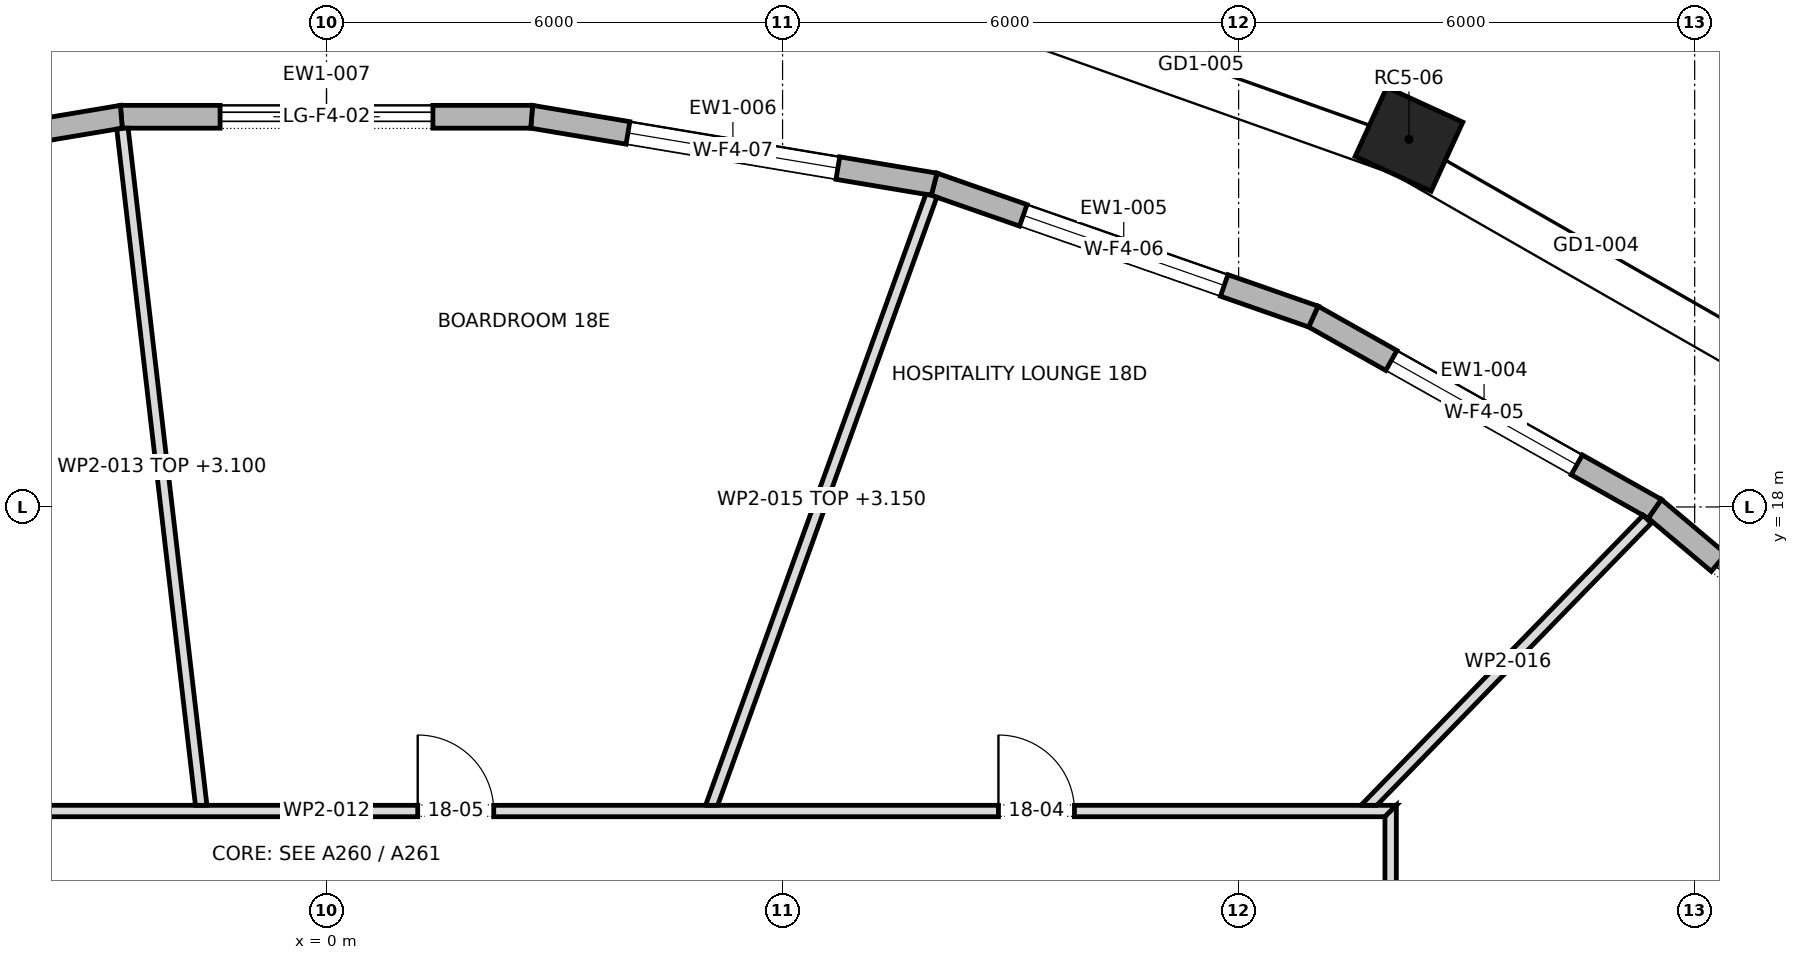
"""IFC4 building model, lengths in metres.
Left out: names, types, materials, properties, quantities, classifications, styles, units other than length and angle.
Written with IfcOpenShell. Run it as: python <this file> out.ifc"""

import sys

from ifc_helpers import new_model, si_unit, direction, frame, frame_2d, origin, origin_2d, place, context, subcontext, project, spatial, polyline, rectangle, outline, extrude, element, fill, save


model = new_model("IFC4")
c1 = context("Model", 3, precision=1e-05, world=origin(), true_north=direction((0.0, 1.0)))
c2 = subcontext(c1, "Body", "Model", "MODEL_VIEW")
j1 = project(units=[si_unit("LENGTHUNIT", "METRE"), si_unit("PLANEANGLEUNIT", "RADIAN")], contexts=[c1])
p1 = place(None, origin())
s1 = spatial("IfcSite", under=j1, at=p1, CompositionType="ELEMENT")
p2 = place(p1, origin())
s2 = spatial("IfcBuilding", under=s1, at=p2, CompositionType="ELEMENT")
p3 = place(p2, frame((0.0, 0.0, 256.3)))
s3 = spatial("IfcBuildingStorey", under=s2, at=p3, CompositionType="ELEMENT", Elevation=256.3)
p4 = place(p3, frame((14.241, 22.837, 0.0), z_axis=(0.0, 0.0, 1.0), x_axis=(-0.909127822794, 0.416517228722, 0.0)))
e1 = element("IfcColumn", 1, at=p4, inside=s3, PredefinedType="COLUMN", context=c2, shape_type="SweptSolid", body=[
    extrude(rectangle(XDim=1.1, YDim=1.0, at=origin_2d()), origin(), (0.0, 0.0, 1.0), 4.0),
])
p5 = place(p3, frame((21.297, 14.756, 0.0), z_axis=(0.0, 0.0, 1.0), x_axis=(-0.764746492461, 0.644331283013, 0.0)))
e2 = element("IfcWall", 2, at=p5, inside=s3, PredefinedType="STANDARD", context=c2, shape_type="SweptSolid", body=[
    extrude(outline(polyline([(-0.015, -0.15), (5.012, -0.15), (4.984, 0.15), (0.015, 0.15), (-0.015, -0.15)])), origin(), (0.0, 0.0, 1.0), 3.7),
])
p6 = place(p5, frame((1.099, 0.0, 0.0)))
e3 = element("IfcOpeningElement", 3, at=p6, cuts=e2, PredefinedType="OPENING", context=c2, shape_type="SweptSolid", body=[
    extrude(rectangle(XDim=2.8, YDim=3.25, at=frame_2d((1.4, 1.625))), frame((0.0, 0.162, 0.0), z_axis=(0.0, -1.0, 0.0), x_axis=(1.0, 0.0, 0.0)), (0.0, 0.0, 1.0), 0.324),
])
p7 = place(p3, frame((17.475, 17.976, 0.0), z_axis=(0.0, 0.0, 1.0), x_axis=(-0.871411047742, 0.490553550465, 0.0)))
e4 = element("IfcWall", 4, at=p7, inside=s3, PredefinedType="STANDARD", context=c2, shape_type="SweptSolid", body=[
    extrude(outline(polyline([(-0.014, -0.15), (5.168, -0.15), (5.141, 0.15), (0.014, 0.15), (-0.014, -0.15)])), origin(), (0.0, 0.0, 1.0), 3.7),
])
p8 = place(p7, frame((1.177, 0.0, 0.6)))
e5 = element("IfcOpeningElement", 5, at=p8, cuts=e4, PredefinedType="OPENING", context=c2, shape_type="SweptSolid", body=[
    extrude(rectangle(XDim=2.8, YDim=2.65, at=frame_2d((1.4, 1.325))), frame((0.0, 0.162, 0.0), z_axis=(0.0, -1.0, 0.0), x_axis=(1.0, 0.0, 0.0)), (0.0, 0.0, 1.0), 0.324),
])
p9 = place(p3, frame((12.983, 20.505, 0.0), z_axis=(0.0, 0.0, 1.0), x_axis=(-0.944149712872, 0.32951679727, 0.0)))
e6 = element("IfcWall", 6, at=p9, inside=s3, PredefinedType="STANDARD", context=c2, shape_type="SweptSolid", body=[
    extrude(outline(polyline([(-0.013, -0.15), (5.297, -0.15), (5.271, 0.15), (0.013, 0.15), (-0.013, -0.15)])), origin(), (0.0, 0.0, 1.0), 3.7),
])
p10 = place(p9, frame((1.242, 0.0, 0.6)))
e7 = element("IfcOpeningElement", 7, at=p10, cuts=e6, PredefinedType="OPENING", context=c2, shape_type="SweptSolid", body=[
    extrude(rectangle(XDim=2.8, YDim=2.65, at=frame_2d((1.4, 1.325))), frame((0.0, 0.162, 0.0), z_axis=(0.0, -1.0, 0.0), x_axis=(1.0, 0.0, 0.0)), (0.0, 0.0, 1.0), 0.324),
])
p11 = place(p3, frame((7.994, 22.246, 0.0), z_axis=(0.0, 0.0, 1.0), x_axis=(-0.986243571741, 0.165298569867, 0.0)))
e8 = element("IfcWall", 8, at=p11, inside=s3, PredefinedType="STANDARD", context=c2, shape_type="SweptSolid", body=[
    extrude(outline(polyline([(-0.013, -0.15), (5.381, -0.15), (5.356, 0.15), (0.013, 0.15), (-0.013, -0.15)])), origin(), (0.0, 0.0, 1.0), 3.7),
])
p12 = place(p11, frame((1.284, 0.0, 0.6)))
e9 = element("IfcOpeningElement", 9, at=p12, cuts=e8, PredefinedType="OPENING", context=c2, shape_type="SweptSolid", body=[
    extrude(rectangle(XDim=2.8, YDim=2.65, at=frame_2d((1.4, 1.325))), frame((0.0, 0.162, 0.0), z_axis=(0.0, -1.0, 0.0), x_axis=(1.0, 0.0, 0.0)), (0.0, 0.0, 1.0), 0.324),
])
p13 = place(p3, frame((2.699, 23.134, 0.0), z_axis=(0.0, 0.0, 1.0), x_axis=(-1.0, 0.0, 0.0)))
e10 = element("IfcWall", 10, at=p13, inside=s3, PredefinedType="STANDARD", context=c2, shape_type="SweptSolid", body=[
    extrude(outline(polyline([(-0.012, -0.15), (5.411, -0.15), (5.386, 0.15), (0.012, 0.15), (-0.012, -0.15)])), origin(), (0.0, 0.0, 1.0), 3.7),
])
p14 = place(p13, frame((1.299, 0.0, 0.0)))
e11 = element("IfcOpeningElement", 11, at=p14, cuts=e10, PredefinedType="OPENING", context=c2, shape_type="SweptSolid", body=[
    extrude(rectangle(XDim=2.8, YDim=3.25, at=frame_2d((1.4, 1.625))), frame((0.0, 0.162, 0.0), z_axis=(0.0, -1.0, 0.0), x_axis=(1.0, 0.0, 0.0)), (0.0, 0.0, 1.0), 0.324),
])
p15 = place(p3, frame((-2.699, 23.134, 0.0), z_axis=(0.0, 0.0, 1.0), x_axis=(-0.986243571741, -0.165298569867, 0.0)))
e12 = element("IfcWall", 12, at=p15, inside=s3, PredefinedType="STANDARD", context=c2, shape_type="SweptSolid", body=[
    extrude(outline(polyline([(-0.012, -0.15), (5.382, -0.15), (5.356, 0.15), (0.012, 0.15), (-0.012, -0.15)])), origin(), (0.0, 0.0, 1.0), 3.7),
])
p16 = place(p15, frame((1.284, 0.0, 0.6)))
e13 = element("IfcOpeningElement", 13, at=p16, cuts=e12, PredefinedType="OPENING", context=c2, shape_type="SweptSolid", body=[
    extrude(rectangle(XDim=2.8, YDim=2.65, at=frame_2d((1.4, 1.325))), frame((0.0, 0.162, 0.0), z_axis=(0.0, -1.0, 0.0), x_axis=(1.0, 0.0, 0.0)), (0.0, 0.0, 1.0), 0.324),
])
p17 = place(p3, frame((-14.075, 14.0, 0.0), z_axis=(0.0, 0.0, 1.0), x_axis=(1.0, 0.0, 0.0)))
e14 = element("IfcWall", 14, at=p17, inside=s3, PredefinedType="PARTITIONING", context=c2, shape_type="SweptSolid", body=[
    extrude(outline(polyline([(0.15, -0.075), (2.139, -0.075), (4.128, -0.075), (6.118, -0.075), (8.107, -0.075), (10.096, -0.075), (12.086, -0.075), (14.075, -0.075), (16.064, -0.075), (18.053, -0.075), (20.043, -0.075), (22.032, -0.075), (24.021, -0.075), (26.011, -0.075), (28.0, -0.075), (28.15, 0.075), (26.273, 0.075), (24.396, 0.075), (22.52, 0.075), (20.643, 0.075), (18.767, 0.075), (16.89, 0.075), (15.013, 0.075), (13.137, 0.075), (11.26, 0.075), (9.383, 0.075), (7.507, 0.075), (5.63, 0.075), (3.753, 0.075), (1.877, 0.075), (0.0, 0.075), (0.15, -0.075)])), origin(), (0.0, 0.0, 1.0), 3.7),
])
p18 = place(p17, frame((22.915, 0.0, 0.0)))
e15 = element("IfcOpeningElement", 15, at=p18, cuts=e14, PredefinedType="OPENING", context=c2, shape_type="SweptSolid", body=[
    extrude(rectangle(XDim=1.0, YDim=2.1, at=frame_2d((0.5, 1.05))), frame((0.0, 0.087, 0.0), z_axis=(0.0, -1.0, 0.0), x_axis=(1.0, 0.0, 0.0)), (0.0, 0.0, 1.0), 0.174),
])
p19 = place(p17, frame((15.275, 0.0, 0.0)))
e16 = element("IfcOpeningElement", 16, at=p19, cuts=e14, PredefinedType="OPENING", context=c2, shape_type="SweptSolid", body=[
    extrude(rectangle(XDim=1.0, YDim=2.1, at=frame_2d((0.5, 1.05))), frame((0.0, 0.087, 0.0), z_axis=(0.0, -1.0, 0.0), x_axis=(1.0, 0.0, 0.0)), (0.0, 0.0, 1.0), 0.174),
])
p20 = place(p17, frame((5.355, 0.0, 0.0)))
e17 = element("IfcOpeningElement", 17, at=p20, cuts=e14, PredefinedType="OPENING", context=c2, shape_type="SweptSolid", body=[
    extrude(rectangle(XDim=1.8, YDim=2.1, at=frame_2d((0.9, 1.05))), frame((0.0, 0.087, 0.0), z_axis=(0.0, -1.0, 0.0), x_axis=(1.0, 0.0, 0.0)), (0.0, 0.0, 1.0), 0.174),
])
p21 = place(p3, frame((-1.648, 14.067, 0.0), z_axis=(0.0, 0.0, 1.0), x_axis=(-0.115608238976, 0.993294888279, 0.0)))
e18 = element("IfcWall", 18, at=p21, inside=s3, PredefinedType="PARTITIONING", context=c2, shape_type="SweptSolid", body=[
    extrude(outline(polyline([(0.0, -0.075), (1.794, -0.075), (3.587, -0.075), (5.381, -0.075), (7.175, -0.075), (8.968, -0.075), (8.973, -0.036), (8.973, 0.075), (7.182, 0.075), (5.391, 0.075), (3.599, 0.075), (1.808, 0.075), (0.017, 0.075), (0.0, -0.072), (0.0, -0.075)])), origin(), (0.0, 0.0, 1.0), 3.1),
])
p22 = place(p3, frame((5.058, 14.05, 0.0), z_axis=(0.0, 0.0, 1.0), x_axis=(0.339015479588, 0.940780795191, 0.0)))
e19 = element("IfcWall", 19, at=p22, inside=s3, PredefinedType="PARTITIONING", context=c2, shape_type="SweptSolid", body=[
    extrude(outline(polyline([(8.557, -0.075), (8.557, -0.05), (8.556, 0.002), (8.543, 0.075), (6.834, 0.075), (5.126, 0.075), (3.417, 0.075), (1.709, 0.075), (0.0, 0.075), (0.0, 0.074), (0.054, -0.075), (1.754, -0.075), (3.455, -0.075), (5.156, -0.075), (6.856, -0.075), (8.557, -0.075)])), origin(), (0.0, 0.0, 1.0), 3.15),
])
p23 = place(p3, frame((13.662, 14.023, 0.0), z_axis=(0.0, 0.0, 1.0), x_axis=(0.697340314613, 0.716740179992, 0.0)))
e20 = element("IfcWall", 20, at=p23, inside=s3, PredefinedType="PARTITIONING", context=c2, shape_type="SweptSolid", body=[
    extrude(outline(polyline([(0.0, 0.075), (0.0, 0.075), (0.146, -0.075), (1.871, -0.075), (3.597, -0.075), (5.323, -0.075), (5.323, 0.075), (3.549, 0.075), (1.774, 0.075), (0.0, 0.075)])), origin(), (0.0, 0.0, 1.0), 3.7),
])
p24 = place(p3, frame((14.0, -14.075, 0.0), z_axis=(0.0, 0.0, 1.0), x_axis=(0.0, 1.0, 0.0)))
e21 = element("IfcWall", 21, at=p24, inside=s3, PredefinedType="PARTITIONING", context=c2, shape_type="SweptSolid", body=[
    extrude(outline(polyline([(0.0, -0.075), (1.877, -0.075), (3.753, -0.075), (5.63, -0.075), (7.507, -0.075), (9.383, -0.075), (11.26, -0.075), (13.137, -0.075), (15.013, -0.075), (16.89, -0.075), (18.767, -0.075), (20.643, -0.075), (22.52, -0.075), (24.396, -0.075), (26.273, -0.075), (28.15, -0.075), (28.0, 0.075), (26.011, 0.075), (24.021, 0.075), (22.032, 0.075), (20.043, 0.075), (18.053, 0.075), (16.064, 0.075), (14.075, 0.075), (12.086, 0.075), (10.096, 0.075), (8.107, 0.075), (6.118, 0.075), (4.128, 0.075), (2.139, 0.075), (0.15, 0.075), (0.0, -0.075)])), origin(), (0.0, 0.0, 1.0), 3.7),
])
p25 = place(p24, frame((12.365, 0.0, 0.0)))
e22 = element("IfcOpeningElement", 22, at=p25, cuts=e21, PredefinedType="OPENING", context=c2, shape_type="SweptSolid", body=[
    extrude(rectangle(XDim=1.0, YDim=2.1, at=frame_2d((0.5, 1.05))), frame((0.0, 0.087, 0.0), z_axis=(0.0, -1.0, 0.0), x_axis=(1.0, 0.0, 0.0)), (0.0, 0.0, 1.0), 0.174),
])
p26 = place(p24, frame((20.755, 0.0, 0.0)))
e23 = element("IfcOpeningElement", 23, at=p26, cuts=e21, PredefinedType="OPENING", context=c2, shape_type="SweptSolid", body=[
    extrude(rectangle(XDim=1.8, YDim=2.1, at=frame_2d((0.9, 1.05))), frame((0.0, 0.087, 0.0), z_axis=(0.0, -1.0, 0.0), x_axis=(1.0, 0.0, 0.0)), (0.0, 0.0, 1.0), 0.174),
])
p27 = place(p6, origin())
e24 = element("IfcDoor", 24, at=p27, inside=s3, OperationType="DOUBLE_DOOR_SLIDING", PredefinedType="DOOR", context=c2, shape_type="SweptSolid", body=[
    extrude(rectangle(XDim=2.8, YDim=3.25, at=frame_2d((1.4, 1.625))), frame((0.0, 0.025, 0.0), z_axis=(0.0, -1.0, 0.0), x_axis=(1.0, 0.0, 0.0)), (0.0, 0.0, 1.0), 0.05),
])
fill(e3, e24)
p28 = place(p8, origin())
e25 = element("IfcWindow", 25, at=p28, inside=s3, PartitioningType="DOUBLE_PANEL_VERTICAL", PredefinedType="WINDOW", context=c2, shape_type="SweptSolid", body=[
    extrude(rectangle(XDim=2.8, YDim=2.65, at=frame_2d((1.4, 1.325))), frame((0.0, 0.03, 0.0), z_axis=(0.0, -1.0, 0.0), x_axis=(1.0, 0.0, 0.0)), (0.0, 0.0, 1.0), 0.06),
])
fill(e5, e25)
p29 = place(p10, origin())
e26 = element("IfcWindow", 26, at=p29, inside=s3, PartitioningType="DOUBLE_PANEL_VERTICAL", PredefinedType="WINDOW", context=c2, shape_type="SweptSolid", body=[
    extrude(rectangle(XDim=2.8, YDim=2.65, at=frame_2d((1.4, 1.325))), frame((0.0, 0.03, 0.0), z_axis=(0.0, -1.0, 0.0), x_axis=(1.0, 0.0, 0.0)), (0.0, 0.0, 1.0), 0.06),
])
fill(e7, e26)
p30 = place(p12, origin())
e27 = element("IfcWindow", 27, at=p30, inside=s3, PartitioningType="DOUBLE_PANEL_VERTICAL", PredefinedType="WINDOW", context=c2, shape_type="SweptSolid", body=[
    extrude(rectangle(XDim=2.8, YDim=2.65, at=frame_2d((1.4, 1.325))), frame((0.0, 0.03, 0.0), z_axis=(0.0, -1.0, 0.0), x_axis=(1.0, 0.0, 0.0)), (0.0, 0.0, 1.0), 0.06),
])
fill(e9, e27)
p31 = place(p14, origin())
e28 = element("IfcDoor", 28, at=p31, inside=s3, OperationType="DOUBLE_DOOR_SLIDING", PredefinedType="DOOR", context=c2, shape_type="SweptSolid", body=[
    extrude(rectangle(XDim=2.8, YDim=3.25, at=frame_2d((1.4, 1.625))), frame((0.0, 0.025, 0.0), z_axis=(0.0, -1.0, 0.0), x_axis=(1.0, 0.0, 0.0)), (0.0, 0.0, 1.0), 0.05),
])
fill(e11, e28)
p32 = place(p18, origin())
e29 = element("IfcDoor", 29, at=p32, inside=s3, OperationType="SINGLE_SWING_RIGHT", PredefinedType="DOOR", context=c2, shape_type="SweptSolid", body=[
    extrude(rectangle(XDim=1.0, YDim=2.1, at=frame_2d((0.5, 1.05))), frame((0.0, 0.025, 0.0), z_axis=(0.0, -1.0, 0.0), x_axis=(1.0, 0.0, 0.0)), (0.0, 0.0, 1.0), 0.05),
])
fill(e15, e29)
p33 = place(p19, origin())
e30 = element("IfcDoor", 30, at=p33, inside=s3, OperationType="SINGLE_SWING_RIGHT", PredefinedType="DOOR", context=c2, shape_type="SweptSolid", body=[
    extrude(rectangle(XDim=1.0, YDim=2.1, at=frame_2d((0.5, 1.05))), frame((0.0, 0.025, 0.0), z_axis=(0.0, -1.0, 0.0), x_axis=(1.0, 0.0, 0.0)), (0.0, 0.0, 1.0), 0.05),
])
fill(e16, e30)
save(model, sys.argv[1])
